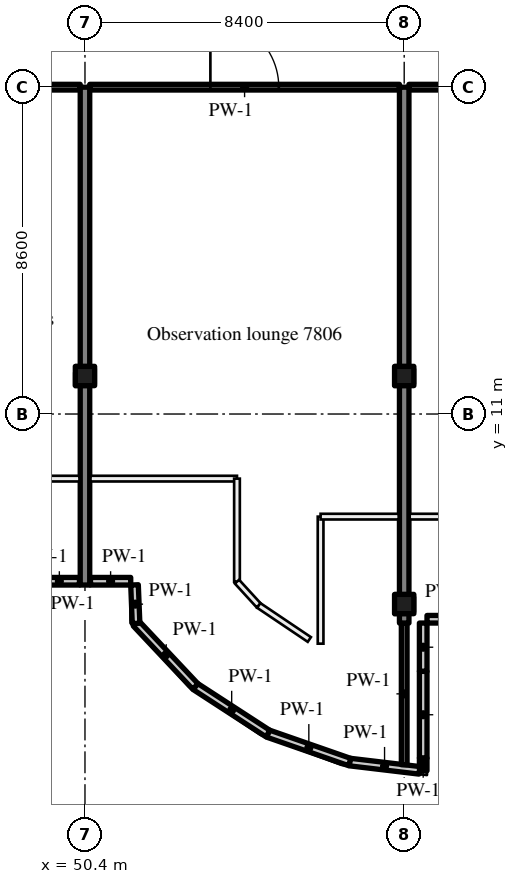
"""IFC4 building model, lengths in metres.
Left out: names, types, materials, properties, quantities, classifications, styles, units other than length and angle.
Written with IfcOpenShell. Run it as: python <this file> out.ifc"""

import sys

from ifc_helpers import new_model, si_unit, direction, frame, frame_2d, origin, origin_2d, place, context, subcontext, project, spatial, rectangle, hollow_circle, extrude, source, transform, mapped, element, fill, save


model = new_model("IFC4")
c1 = context("Model", 3, precision=1e-05, world=origin(), true_north=direction((0.0, 1.0)))
c2 = subcontext(c1, "Body", "Model", "MODEL_VIEW")
j1 = project(units=[si_unit("LENGTHUNIT", "METRE"), si_unit("PLANEANGLEUNIT", "RADIAN")], contexts=[c1])
p1 = place(None, origin())
s1 = spatial("IfcSite", under=j1, at=p1, CompositionType="ELEMENT")
p2 = place(p1, origin())
s2 = spatial("IfcBuilding", under=s1, at=p2, CompositionType="ELEMENT")
p3 = place(p2, frame((0.0, 0.0, 329.7)))
s3 = spatial("IfcBuildingStorey", under=s2, at=p3, CompositionType="ELEMENT", Elevation=329.7)
m1 = source(origin(), c2, "Body", "SweptSolid", [
    extrude(rectangle(XDim=13.1, YDim=0.25, at=frame_2d((6.55, 0.0))), origin(), (0.0, 0.0, 1.0), 4.72),
])
p4 = place(p3, frame((50.4, 6.5, 0.0), z_axis=(0.0, 0.0, 1.0), x_axis=(0.0, 1.0, 0.0)))
e1 = element("IfcWall", 1, at=p4, inside=s3, PredefinedType="SHEAR", context=c2, shape_type="MappedRepresentation", body=[
    mapped(m1, transform((0.0, 0.0, 0.0), scale=1.0)),
])
m2 = source(origin(), c2, "Body", "SweptSolid", [
    extrude(rectangle(XDim=14.1, YDim=0.25, at=frame_2d((7.05, 0.0))), origin(), (0.0, 0.0, 1.0), 4.72),
])
p5 = place(p3, frame((58.8, 5.5, 0.0), z_axis=(0.0, 0.0, 1.0), x_axis=(0.0, 1.0, 0.0)))
e2 = element("IfcWall", 2, at=p5, inside=s3, PredefinedType="SHEAR", context=c2, shape_type="MappedRepresentation", body=[
    mapped(m2, transform((0.0, 0.0, 0.0), scale=1.0)),
])
m3 = source(origin(), c2, "Body", "SweptSolid", [
    extrude(hollow_circle(Radius=0.254, WallThickness=0.02, at=origin_2d()), origin(), (0.0, 0.0, 1.0), 4.4),
])
for number, where, z_axis, x_axis in (
    (3, (58.8, 6.0, 5.0), (0.0, 0.0, 1.0), (1.0, 0.0, 0.0)),
    (4, (50.4, 12.0, 5.0), (0.0, 0.0, 1.0), (1.0, 0.0, 0.0)),
    (5, (58.8, 12.0, 5.0), (0.0, 0.0, 1.0), (1.0, 0.0, 0.0)),
):
    element("IfcColumn", number, at=place(p3, frame(where, z_axis=z_axis, x_axis=x_axis)), inside=s3, PredefinedType="COLUMN", context=c2, shape_type="MappedRepresentation", body=[
        mapped(m3, transform((0.0, 0.0, 0.0), scale=1.0)),
    ])
m4 = source(origin(), c2, "Body", "SweptSolid", [
    extrude(rectangle(XDim=1.059, YDim=0.2, at=frame_2d((0.529, 0.0))), origin(), (0.0, 0.0, 1.0), 1.1),
])
p6 = place(p3, frame((50.255, 6.6, 0.0), z_axis=(0.0, 0.0, 1.0), x_axis=(-1.0, 0.0, 0.0)))
e6 = element("IfcWall", 6, at=p6, inside=s3, PredefinedType="PARAPET", context=c2, shape_type="MappedRepresentation", body=[
    mapped(m4, transform((0.0, 0.0, 0.0), scale=1.0)),
])
m5 = source(origin(), c2, "Body", "SweptSolid", [
    extrude(rectangle(XDim=0.81, YDim=0.2, at=frame_2d((0.405, 0.0))), origin(), (0.0, 0.0, 1.0), 1.1),
])
p7 = place(p3, frame((60.21, 5.6, 0.0), z_axis=(0.0, 0.0, 1.0), x_axis=(-1.0, 0.0, 0.0)))
e7 = element("IfcWall", 7, at=p7, inside=s3, PredefinedType="PARAPET", context=c2, shape_type="MappedRepresentation", body=[
    mapped(m5, transform((0.0, 0.0, 0.0), scale=1.0)),
])
m6 = source(origin(), c2, "Body", "SweptSolid", [
    extrude(rectangle(XDim=1.272, YDim=0.2, at=frame_2d((0.636, 0.0))), origin(), (0.0, 0.0, 1.0), 1.1),
])
p8 = place(p3, frame((59.3, 5.5, 0.0), z_axis=(0.0, 0.0, 1.0), x_axis=(0.0, -1.0, 0.0)))
e8 = element("IfcWall", 8, at=p8, inside=s3, PredefinedType="PARAPET", context=c2, shape_type="MappedRepresentation", body=[
    mapped(m6, transform((0.0, 0.0, 0.0), scale=1.0)),
])
m7 = source(origin(), c2, "Body", "SweptSolid", [
    extrude(rectangle(XDim=2.282, YDim=0.2, at=frame_2d((1.141, 0.0))), origin(), (0.0, 0.0, 1.0), 1.1),
])
p9 = place(p3, frame((59.3, 4.228, 0.0), z_axis=(0.0, 0.0, 1.0), x_axis=(0.0, -1.0, 0.0)))
e9 = element("IfcWall", 9, at=p9, inside=s3, PredefinedType="PARAPET", context=c2, shape_type="MappedRepresentation", body=[
    mapped(m7, transform((0.0, 0.0, 0.0), scale=1.0)),
])
m8 = source(origin(), c2, "Body", "SweptSolid", [
    extrude(rectangle(XDim=0.334, YDim=0.2, at=frame_2d((0.167, 0.0))), origin(), (0.0, 0.0, 1.0), 1.1),
])
p10 = place(p3, frame((59.3, 1.946, 0.0), z_axis=(0.0, 0.0, 1.0), x_axis=(0.0, -1.0, 0.0)))
e10 = element("IfcWall", 10, at=p10, inside=s3, PredefinedType="PARAPET", context=c2, shape_type="MappedRepresentation", body=[
    mapped(m8, transform((0.0, 0.0, 0.0), scale=1.0)),
])
m9 = source(origin(), c2, "Body", "SweptSolid", [
    extrude(rectangle(XDim=1.848, YDim=0.2, at=frame_2d((0.924, 0.0))), origin(), (0.0, 0.0, 1.0), 1.1),
])
p11 = place(p3, frame((59.201, 1.625, 0.0), z_axis=(0.0, 0.0, 1.0), x_axis=(-0.993015572698, 0.117983356362, 0.0)))
e11 = element("IfcWall", 11, at=p11, inside=s3, PredefinedType="PARAPET", context=c2, shape_type="MappedRepresentation", body=[
    mapped(m9, transform((0.0, 0.0, 0.0), scale=1.0)),
])
m10 = source(origin(), c2, "Body", "SweptSolid", [
    extrude(rectangle(XDim=2.277, YDim=0.2, at=frame_2d((1.138, 0.0))), origin(), (0.0, 0.0, 1.0), 1.1),
])
p12 = place(p3, frame((57.366, 1.843, 0.0), z_axis=(0.0, 0.0, 1.0), x_axis=(-0.944407068574, 0.328778479874, 0.0)))
e12 = element("IfcWall", 12, at=p12, inside=s3, PredefinedType="PARAPET", context=c2, shape_type="MappedRepresentation", body=[
    mapped(m10, transform((0.0, 0.0, 0.0), scale=1.0)),
])
m11 = source(origin(), c2, "Body", "SweptSolid", [
    extrude(rectangle(XDim=2.277, YDim=0.2, at=frame_2d((1.139, 0.0))), origin(), (0.0, 0.0, 1.0), 1.1),
])
p13 = place(p3, frame((55.216, 2.591, 0.0), z_axis=(0.0, 0.0, 1.0), x_axis=(-0.838847508912, 0.544366472876, 0.0)))
e13 = element("IfcWall", 13, at=p13, inside=s3, PredefinedType="PARAPET", context=c2, shape_type="MappedRepresentation", body=[
    mapped(m11, transform((0.0, 0.0, 0.0), scale=1.0)),
])
m12 = source(origin(), c2, "Body", "SweptSolid", [
    extrude(rectangle(XDim=2.278, YDim=0.2, at=frame_2d((1.139, 0.0))), origin(), (0.0, 0.0, 1.0), 1.1),
])
p14 = place(p3, frame((53.305, 3.831, 0.0), z_axis=(0.0, 0.0, 1.0), x_axis=(-0.685073837693, 0.728473635013, 0.0)))
e14 = element("IfcWall", 14, at=p14, inside=s3, PredefinedType="PARAPET", context=c2, shape_type="MappedRepresentation", body=[
    mapped(m12, transform((0.0, 0.0, 0.0), scale=1.0)),
])
m13 = source(origin(), c2, "Body", "SweptSolid", [
    extrude(rectangle(XDim=1.014, YDim=0.2, at=frame_2d((0.507, 0.0))), origin(), (0.0, 0.0, 1.0), 1.1),
])
p15 = place(p3, frame((51.744, 5.49, 0.0), z_axis=(0.0, 0.0, 1.0), x_axis=(-0.039958425192, 0.999201343202, 0.0)))
e15 = element("IfcWall", 15, at=p15, inside=s3, PredefinedType="PARAPET", context=c2, shape_type="MappedRepresentation", body=[
    mapped(m13, transform((0.0, 0.0, 0.0), scale=1.0)),
])
m14 = source(origin(), c2, "Body", "SweptSolid", [
    extrude(rectangle(XDim=1.059, YDim=0.2, at=frame_2d((0.53, 0.0))), origin(), (0.0, 0.0, 1.0), 1.1),
])
p16 = place(p3, frame((51.604, 6.6, 0.0), z_axis=(0.0, 0.0, 1.0), x_axis=(-1.0, 0.0, 0.0)))
e16 = element("IfcWall", 16, at=p16, inside=s3, PredefinedType="PARAPET", context=c2, shape_type="MappedRepresentation", body=[
    mapped(m14, transform((0.0, 0.0, 0.0), scale=1.0)),
])
m15 = source(origin(), c2, "Body", "SweptSolid", [
    extrude(rectangle(XDim=4.0, YDim=0.15, at=frame_2d((2.0, 0.0))), origin(), (0.0, 0.0, 1.0), 4.02),
])
p17 = place(p3, frame((46.275, 19.6, 0.0), z_axis=(0.0, 0.0, 1.0), x_axis=(1.0, 0.0, 0.0)))
e17 = element("IfcWall", 17, at=p17, inside=s3, PredefinedType="PARTITIONING", context=c2, shape_type="MappedRepresentation", body=[
    mapped(m15, transform((0.0, 0.0, 0.0), scale=1.0)),
])
m16 = source(origin(), c2, "Body", "SweptSolid", [
    extrude(rectangle(XDim=1.0, YDim=2.1, at=frame_2d((0.5, 1.05))), frame((0.0, 0.085, 0.0), z_axis=(0.0, -1.0, 0.0), x_axis=(1.0, 0.0, 0.0)), (0.0, 0.0, 1.0), 0.17),
])
p18 = place(p17, frame((1.5, 0.0, 0.0)))
e18 = element("IfcOpeningElement", 18, at=p18, cuts=e17, PredefinedType="OPENING", context=c2, shape_type="MappedRepresentation", body=[
    mapped(m16, transform((0.0, 0.0, 0.0), scale=1.0)),
])
m17 = source(origin(), c2, "Body", "SweptSolid", [
    extrude(rectangle(XDim=8.15, YDim=0.15, at=frame_2d((4.075, 0.0))), origin(), (0.0, 0.0, 1.0), 4.02),
])
p19 = place(p3, frame((50.525, 19.6, 0.0), z_axis=(0.0, 0.0, 1.0), x_axis=(1.0, 0.0, 0.0)))
e19 = element("IfcWall", 19, at=p19, inside=s3, PredefinedType="PARTITIONING", context=c2, shape_type="MappedRepresentation", body=[
    mapped(m17, transform((0.0, 0.0, 0.0), scale=1.0)),
])
m18 = source(origin(), c2, "Body", "SweptSolid", [
    extrude(rectangle(XDim=1.8, YDim=2.1, at=frame_2d((0.9, 1.05))), frame((0.0, 0.085, 0.0), z_axis=(0.0, -1.0, 0.0), x_axis=(1.0, 0.0, 0.0)), (0.0, 0.0, 1.0), 0.17),
])
p20 = place(p19, frame((3.175, 0.0, 0.0)))
e20 = element("IfcOpeningElement", 20, at=p20, cuts=e19, PredefinedType="OPENING", context=c2, shape_type="MappedRepresentation", body=[
    mapped(m18, transform((0.0, 0.0, 0.0), scale=1.0)),
])
m19 = source(origin(), c2, "Body", "SweptSolid", [
    extrude(rectangle(XDim=8.15, YDim=0.15, at=frame_2d((4.075, 0.0))), origin(), (0.0, 0.0, 1.0), 4.02),
])
p21 = place(p3, frame((58.925, 19.6, 0.0), z_axis=(0.0, 0.0, 1.0), x_axis=(1.0, 0.0, 0.0)))
e21 = element("IfcWall", 21, at=p21, inside=s3, PredefinedType="PARTITIONING", context=c2, shape_type="MappedRepresentation", body=[
    mapped(m19, transform((0.0, 0.0, 0.0), scale=1.0)),
])
p22 = place(p21, frame((3.175, 0.0, 0.0)))
e22 = element("IfcOpeningElement", 22, at=p22, cuts=e21, PredefinedType="OPENING", context=c2, shape_type="MappedRepresentation", body=[
    mapped(m18, transform((0.0, 0.0, 0.0), scale=1.0)),
])
m20 = source(origin(), c2, "Body", "SweptSolid", [
    extrude(rectangle(XDim=3.727, YDim=0.15, at=frame_2d((1.864, 0.0))), origin(), (0.0, 0.0, 1.0), 4.72),
])
p23 = place(p3, frame((58.8, 1.773, 0.0), z_axis=(0.0, 0.0, 1.0), x_axis=(0.0, 1.0, 0.0)))
e23 = element("IfcWall", 23, at=p23, inside=s3, PredefinedType="PARTITIONING", context=c2, shape_type="MappedRepresentation", body=[
    mapped(m20, transform((0.0, 0.0, 0.0), scale=1.0)),
])
m21 = source(origin(), c2, "Body", "SweptSolid", [
    extrude(rectangle(XDim=1.8, YDim=2.1, at=frame_2d((0.9, 1.05))), frame((0.0, 0.025, 0.0), z_axis=(0.0, -1.0, 0.0), x_axis=(1.0, 0.0, 0.0)), (0.0, 0.0, 1.0), 0.05),
])
p24 = place(p20, origin())
e24 = element("IfcDoor", 24, at=p24, inside=s3, OperationType="DOUBLE_DOOR_SINGLE_SWING", PredefinedType="DOOR", context=c2, shape_type="MappedRepresentation", body=[
    mapped(m21, transform((0.0, 0.0, 0.0), scale=1.0)),
])
fill(e20, e24)
save(model, sys.argv[1])
